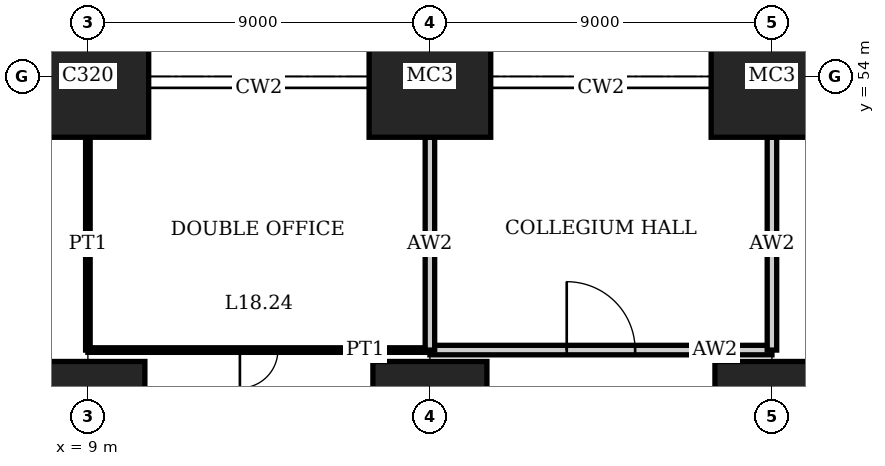
"""IFC4 building model, lengths in metres.
Left out: names, types, materials, properties, quantities, classifications, styles, units other than length and angle.
Written with IfcOpenShell. Run it as: python <this file> out.ifc"""

import sys

from ifc_helpers import new_model, si_unit, direction, frame, frame_2d, origin, origin_2d, place, context, subcontext, project, spatial, rectangle, extrude, element, fill, save


model = new_model("IFC4")
c1 = context("Model", 3, precision=1e-05, world=origin(), true_north=direction((0.0, 1.0)))
c2 = subcontext(c1, "Body", "Model", "MODEL_VIEW")
j1 = project(units=[si_unit("LENGTHUNIT", "METRE"), si_unit("PLANEANGLEUNIT", "RADIAN")], contexts=[c1])
p1 = place(None, origin())
s1 = spatial("IfcSite", under=j1, at=p1, CompositionType="ELEMENT")
p2 = place(p1, origin())
s2 = spatial("IfcBuilding", under=s1, at=p2, CompositionType="ELEMENT")
p3 = place(p2, frame((0.0, 0.0, 75.8)))
s3 = spatial("IfcBuildingStorey", under=s2, at=p3, CompositionType="ELEMENT", Elevation=75.8)
p4 = place(p3, frame((9.0, 45.0, 0.0), z_axis=(0.0, 0.0, 1.0), x_axis=(1.0, 0.0, 0.0)))
e1 = element("IfcColumn", 1, at=p4, inside=s3, PredefinedType="COLUMN", context=c2, shape_type="SweptSolid", body=[
    extrude(rectangle(XDim=3.0, YDim=3.0, at=origin_2d()), origin(), (0.0, 0.0, 1.0), 4.2),
])
p5 = place(p3, frame((9.0, 54.0, 0.0), z_axis=(0.0, 0.0, 1.0), x_axis=(1.0, 0.0, 0.0)))
e2 = element("IfcColumn", 2, at=p5, inside=s3, PredefinedType="COLUMN", context=c2, shape_type="SweptSolid", body=[
    extrude(rectangle(XDim=3.2, YDim=3.2, at=origin_2d()), origin(), (0.0, 0.0, 1.0), 4.2),
])
p6 = place(p3, frame((18.0, 45.0, 0.0), z_axis=(0.0, 0.0, 1.0), x_axis=(1.0, 0.0, 0.0)))
e3 = element("IfcColumn", 3, at=p6, inside=s3, PredefinedType="COLUMN", context=c2, shape_type="SweptSolid", body=[
    extrude(rectangle(XDim=3.0, YDim=3.0, at=origin_2d()), origin(), (0.0, 0.0, 1.0), 4.2),
])
p7 = place(p3, frame((18.0, 54.0, 0.0), z_axis=(0.0, 0.0, 1.0), x_axis=(1.0, 0.0, 0.0)))
e4 = element("IfcColumn", 4, at=p7, inside=s3, PredefinedType="COLUMN", context=c2, shape_type="SweptSolid", body=[
    extrude(rectangle(XDim=3.2, YDim=3.2, at=origin_2d()), origin(), (0.0, 0.0, 1.0), 4.2),
])
p8 = place(p3, frame((27.0, 45.0, 0.0), z_axis=(0.0, 0.0, 1.0), x_axis=(1.0, 0.0, 0.0)))
e5 = element("IfcColumn", 5, at=p8, inside=s3, PredefinedType="COLUMN", context=c2, shape_type="SweptSolid", body=[
    extrude(rectangle(XDim=3.0, YDim=3.0, at=origin_2d()), origin(), (0.0, 0.0, 1.0), 4.2),
])
p9 = place(p3, frame((27.0, 54.0, 0.0), z_axis=(0.0, 0.0, 1.0), x_axis=(1.0, 0.0, 0.0)))
e6 = element("IfcColumn", 6, at=p9, inside=s3, PredefinedType="COLUMN", context=c2, shape_type="SweptSolid", body=[
    extrude(rectangle(XDim=3.2, YDim=3.2, at=origin_2d()), origin(), (0.0, 0.0, 1.0), 4.2),
])
p10 = place(p3, frame((18.0, 46.8, 0.0), z_axis=(0.0, 0.0, 1.0), x_axis=(1.0, 0.0, 0.0)))
e7 = element("IfcWall", 7, at=p10, inside=s3, PredefinedType="PARTITIONING", context=c2, shape_type="SweptSolid", body=[
    extrude(rectangle(XDim=9.0, YDim=0.25, at=frame_2d((4.5, 0.0))), origin(), (0.0, 0.0, 1.0), 3.85),
])
p11 = place(p10, frame((3.6, 0.0, 0.0)))
e8 = element("IfcOpeningElement", 8, at=p11, cuts=e7, PredefinedType="OPENING", context=c2, shape_type="SweptSolid", body=[
    extrude(rectangle(XDim=1.8, YDim=2.4, at=frame_2d((0.9, 1.2))), frame((0.0, 0.135, 0.0), z_axis=(0.0, -1.0, 0.0), x_axis=(1.0, 0.0, 0.0)), (0.0, 0.0, 1.0), 0.27),
])
p12 = place(p3, frame((9.0, 46.8, 0.0), z_axis=(0.0, 0.0, 1.0), x_axis=(1.0, 0.0, 0.0)))
e9 = element("IfcWall", 9, at=p12, inside=s3, PredefinedType="PARTITIONING", context=c2, shape_type="SweptSolid", body=[
    extrude(rectangle(XDim=9.0, YDim=0.12, at=frame_2d((4.5, 0.0))), origin(), (0.0, 0.0, 1.0), 3.85),
])
p13 = place(p12, frame((4.0, 0.0, 0.0)))
e10 = element("IfcOpeningElement", 10, at=p13, cuts=e9, PredefinedType="OPENING", context=c2, shape_type="SweptSolid", body=[
    extrude(rectangle(XDim=1.0, YDim=2.4, at=frame_2d((0.5, 1.2))), frame((0.0, 0.07, 0.0), z_axis=(0.0, -1.0, 0.0), x_axis=(1.0, 0.0, 0.0)), (0.0, 0.0, 1.0), 0.14),
])
p14 = place(p3, frame((9.0, 46.8, 0.0), z_axis=(0.0, 0.0, 1.0), x_axis=(0.0, 1.0, 0.0)))
e11 = element("IfcWall", 11, at=p14, inside=s3, PredefinedType="PARTITIONING", context=c2, shape_type="SweptSolid", body=[
    extrude(rectangle(XDim=5.6, YDim=0.12, at=frame_2d((2.8, 0.0))), origin(), (0.0, 0.0, 1.0), 3.05),
])
for number, where, z_axis, x_axis in (
    (12, (18.0, 46.8, 0.0), (0.0, 0.0, 1.0), (0.0, 1.0, 0.0)),
    (13, (27.0, 46.8, 0.0), (0.0, 0.0, 1.0), (0.0, 1.0, 0.0)),
):
    element("IfcWall", number, at=place(p3, frame(where, z_axis=z_axis, x_axis=x_axis)), inside=s3, PredefinedType="PARTITIONING", context=c2, shape_type="SweptSolid", body=[
        extrude(rectangle(XDim=5.6, YDim=0.25, at=frame_2d((2.8, 0.0))), origin(), (0.0, 0.0, 1.0), 3.25),
    ])
p15 = place(p11, origin())
e14 = element("IfcDoor", 14, at=p15, inside=s3, OperationType="DOUBLE_DOOR_SINGLE_SWING", PredefinedType="DOOR", context=c2, shape_type="SweptSolid", body=[
    extrude(rectangle(XDim=1.8, YDim=2.4, at=frame_2d((0.9, 1.2))), frame((0.0, 0.025, 0.0), z_axis=(0.0, -1.0, 0.0), x_axis=(1.0, 0.0, 0.0)), (0.0, 0.0, 1.0), 0.05),
])
fill(e8, e14)
p16 = place(p13, origin())
e15 = element("IfcDoor", 15, at=p16, inside=s3, OperationType="SINGLE_SWING_LEFT", PredefinedType="DOOR", context=c2, shape_type="SweptSolid", body=[
    extrude(rectangle(XDim=1.0, YDim=2.4, at=frame_2d((0.5, 1.2))), frame((0.0, 0.025, 0.0), z_axis=(0.0, -1.0, 0.0), x_axis=(1.0, 0.0, 0.0)), (0.0, 0.0, 1.0), 0.05),
])
fill(e10, e15)
save(model, sys.argv[1])
